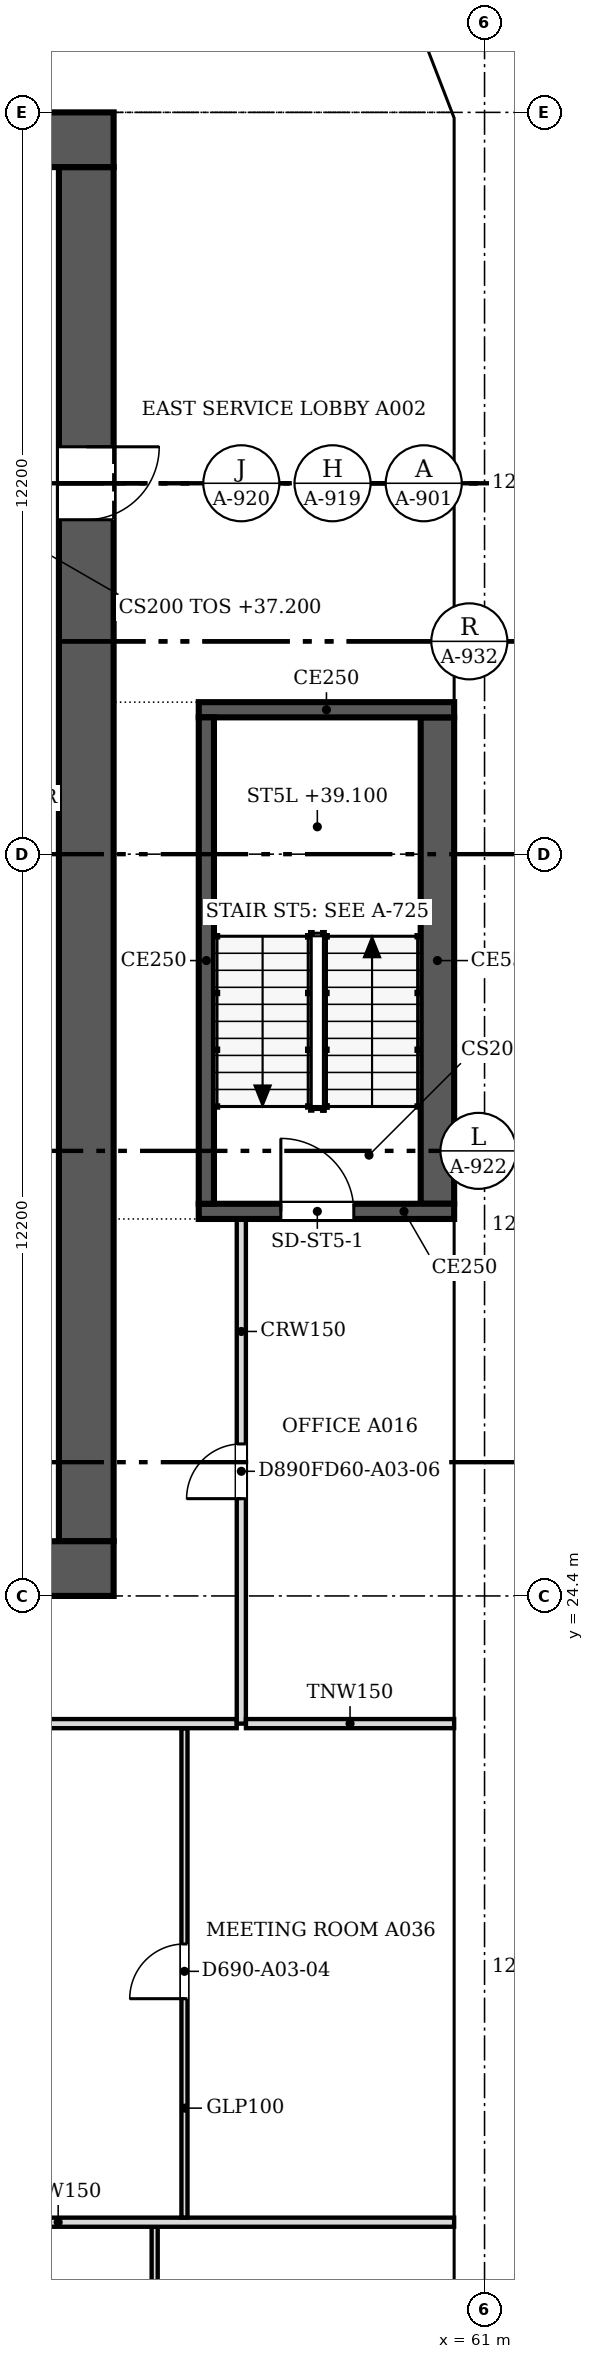
"""IFC4 building model, lengths in metres.
Left out: names, types, materials, properties, quantities, classifications, styles, units other than length and angle.
Written with IfcOpenShell. Run it as: python <this file> out.ifc"""

import sys

from ifc_helpers import new_model, si_unit, direction, frame, frame_2d, origin, place, context, subcontext, project, spatial, polyline, rectangle, outline, extrude, faceted_brep, source, transform, mapped, element, fill, save


model = new_model("IFC4")
c1 = context("Model", 3, precision=1e-05, world=origin(), true_north=direction((0.0, 1.0)))
c2 = subcontext(c1, "Body", "Model", "MODEL_VIEW")
j1 = project(units=[si_unit("LENGTHUNIT", "METRE"), si_unit("PLANEANGLEUNIT", "RADIAN")], contexts=[c1])
p1 = place(None, origin())
s1 = spatial("IfcSite", under=j1, at=p1, CompositionType="ELEMENT")
p2 = place(p1, origin())
s2 = spatial("IfcBuilding", under=s1, at=p2, CompositionType="ELEMENT")
p3 = place(p2, frame((0.0, 0.0, 37.2)))
s3 = spatial("IfcBuildingStorey", under=s2, at=p3, CompositionType="ELEMENT", Elevation=37.2)
m1 = source(origin(), c2, "Body", "SweptSolid", [
    extrude(outline(polyline([(3.05, 0.0), (6.1, 3.8), (3.05, 7.6), (0.0, 3.8), (3.05, 0.0)])), frame((0.0, 0.25, 0.0), z_axis=(0.0, -1.0, 0.0), x_axis=(1.0, 0.0, 0.0)), (0.0, 0.0, 1.0), 0.5),
])
p4 = place(p3, frame((60.75, 9.15, -3.8), z_axis=(0.0, 0.0, 1.0), x_axis=(0.0, 1.0, 0.0)))
e1 = element("IfcWall", 1, at=p4, inside=s3, PredefinedType="SOLIDWALL", context=c2, shape_type="MappedRepresentation", body=[
    mapped(m1, transform((0.0, 0.0, 0.0), scale=1.0)),
])
m2 = source(origin(), c2, "Body", "SweptSolid", [
    extrude(outline(polyline([(3.05, 0.399), (5.78, 3.8), (3.05, 7.201), (0.321, 3.8), (3.05, 0.399)])), frame((0.0, 0.26, 0.0), z_axis=(0.0, -1.0, 0.0), x_axis=(1.0, 0.0, 0.0)), (0.0, 0.0, 1.0), 0.52),
])
p5 = place(p4, origin())
e2 = element("IfcOpeningElement", 2, at=p5, cuts=e1, PredefinedType="OPENING", context=c2, shape_type="MappedRepresentation", body=[
    mapped(m2, transform((0.0, 0.0, 0.0), scale=1.0)),
])
p6 = place(p3, frame((60.75, 15.25, -3.8), z_axis=(0.0, 0.0, 1.0), x_axis=(0.0, 1.0, 0.0)))
e3 = element("IfcWall", 3, at=p6, inside=s3, PredefinedType="SOLIDWALL", context=c2, shape_type="MappedRepresentation", body=[
    mapped(m1, transform((0.0, 0.0, 0.0), scale=1.0)),
])
p7 = place(p6, origin())
e4 = element("IfcOpeningElement", 4, at=p7, cuts=e3, PredefinedType="OPENING", context=c2, shape_type="MappedRepresentation", body=[
    mapped(m2, transform((0.0, 0.0, 0.0), scale=1.0)),
])
m3 = source(origin(), c2, "Body", "Brep", [
    faceted_brep([(3.05, -0.25, 0.0), (6.1, -0.25, 3.8), (6.1, -0.25, 3.8), (3.05, -0.25, 7.6), (0.0, -0.25, 3.8), (0.0, 0.25, 3.8), (3.05, 0.25, 7.6), (6.1, 0.25, 3.8), (6.1, 0.25, 3.8), (3.05, 0.25, 0.0)], [[[0, 1, 2, 3, 4]], [[5, 6, 7, 8, 9]], [[9, 8, 1, 0]], [[7, 6, 3, 2]], [[6, 5, 4, 3]], [[5, 9, 0, 4]], [[1, 8, 7, 2]]]),
])
p8 = place(p3, frame((60.75, 21.35, -3.8), z_axis=(0.0, 0.0, 1.0), x_axis=(0.0, 1.0, 0.0)))
e5 = element("IfcWall", 5, at=p8, inside=s3, PredefinedType="SOLIDWALL", context=c2, shape_type="MappedRepresentation", body=[
    mapped(m3, transform((0.0, 0.0, 0.0), scale=1.0)),
])
p9 = place(p8, origin())
e6 = element("IfcOpeningElement", 6, at=p9, cuts=e5, PredefinedType="OPENING", context=c2, shape_type="MappedRepresentation", body=[
    mapped(m2, transform((0.0, 0.0, 0.0), scale=1.0)),
])
p10 = place(p3, frame((60.75, 27.45, -3.8), z_axis=(0.0, 0.0, 1.0), x_axis=(0.0, 1.0, 0.0)))
e7 = element("IfcWall", 7, at=p10, inside=s3, PredefinedType="SOLIDWALL", context=c2, shape_type="MappedRepresentation", body=[
    mapped(m1, transform((0.0, 0.0, 0.0), scale=1.0)),
])
p11 = place(p10, origin())
e8 = element("IfcOpeningElement", 8, at=p11, cuts=e7, PredefinedType="OPENING", context=c2, shape_type="MappedRepresentation", body=[
    mapped(m2, transform((0.0, 0.0, 0.0), scale=1.0)),
])
p12 = place(p3, frame((60.75, 33.55, -3.8), z_axis=(0.0, 0.0, 1.0), x_axis=(0.0, 1.0, 0.0)))
e9 = element("IfcWall", 9, at=p12, inside=s3, PredefinedType="SOLIDWALL", context=c2, shape_type="MappedRepresentation", body=[
    mapped(m3, transform((0.0, 0.0, 0.0), scale=1.0)),
])
p13 = place(p12, origin())
e10 = element("IfcOpeningElement", 10, at=p13, cuts=e9, PredefinedType="OPENING", context=c2, shape_type="MappedRepresentation", body=[
    mapped(m2, transform((0.0, 0.0, 0.0), scale=1.0)),
])
p14 = place(p3, frame((60.75, 39.65, -3.8), z_axis=(0.0, 0.0, 1.0), x_axis=(0.0, 1.0, 0.0)))
e11 = element("IfcWall", 11, at=p14, inside=s3, PredefinedType="SOLIDWALL", context=c2, shape_type="MappedRepresentation", body=[
    mapped(m1, transform((0.0, 0.0, 0.0), scale=1.0)),
])
p15 = place(p14, origin())
e12 = element("IfcOpeningElement", 12, at=p15, cuts=e11, PredefinedType="OPENING", context=c2, shape_type="MappedRepresentation", body=[
    mapped(m2, transform((0.0, 0.0, 0.0), scale=1.0)),
])
m4 = source(origin(), c2, "Body", "Brep", [
    faceted_brep([(3.003, -0.25, 0.0), (3.05, -0.25, 0.06), (3.05, -0.25, 7.54), (3.003, -0.25, 7.6), (0.0, -0.25, 3.8), (0.0, 0.25, 3.8), (2.957, 0.25, 7.541), (2.957, 0.25, 0.059), (3.003, 0.0, 0.0), (3.003, 0.0, 7.6)], [[[0, 1, 2, 3, 4]], [[5, 6, 7]], [[1, 0, 8]], [[9, 3, 2]], [[6, 5, 4, 3, 9]], [[5, 7, 8, 0, 4]], [[1, 8, 7, 6, 9, 2]]]),
])
p16 = place(p3, frame((60.75, 45.75, -3.8), z_axis=(0.0, 0.0, 1.0), x_axis=(0.0, 1.0, 0.0)))
e13 = element("IfcWall", 13, at=p16, inside=s3, PredefinedType="SOLIDWALL", context=c2, shape_type="MappedRepresentation", body=[
    mapped(m4, transform((0.0, 0.0, 0.0), scale=1.0)),
])
m5 = source(origin(), c2, "Body", "SweptSolid", [
    extrude(outline(polyline([(2.803, 6.944), (0.319, 3.8), (2.803, 0.656), (2.803, 6.944)])), frame((0.0, 0.26, 0.0), z_axis=(0.0, -1.0, 0.0), x_axis=(1.0, 0.0, 0.0)), (0.0, 0.0, 1.0), 0.52),
])
p17 = place(p16, origin())
e14 = element("IfcOpeningElement", 14, at=p17, cuts=e13, PredefinedType="OPENING", context=c2, shape_type="MappedRepresentation", body=[
    mapped(m5, transform((0.0, 0.0, 0.0), scale=1.0)),
])
m6 = source(origin(), c2, "Body", "Brep", [
    faceted_brep([(0.047, -0.25, 0.0), (2.997, -0.25, 3.8), (0.047, -0.25, 7.6), (0.0, -0.25, 7.541), (0.0, -0.25, 0.059), (0.093, 0.25, 7.54), (2.944, 0.25, 3.868), (2.944, 0.25, 3.732), (0.093, 0.25, 0.06), (2.997, 0.0, 3.8), (0.047, 0.0, 0.0), (0.047, 0.0, 7.6)], [[[0, 1, 2, 3, 4]], [[5, 6, 7, 8]], [[8, 7, 9, 1, 0, 10]], [[6, 5, 11, 2, 1, 9]], [[3, 2, 11]], [[10, 0, 4]], [[8, 10, 4, 3, 11, 5]], [[9, 7, 6]]]),
])
p18 = place(p3, frame((60.767, 48.71, -3.8), z_axis=(0.0, 0.0, 1.0), x_axis=(-0.359901446078, 0.932990326376, 0.0)))
e15 = element("IfcWall", 15, at=p18, inside=s3, PredefinedType="SOLIDWALL", context=c2, shape_type="MappedRepresentation", body=[
    mapped(m6, transform((0.0, 0.0, 0.0), scale=1.0)),
])
m7 = source(origin(), c2, "Body", "SweptSolid", [
    extrude(outline(polyline([(0.247, 0.665), (2.681, 3.8), (0.247, 6.935), (0.247, 0.665)])), frame((0.0, 0.26, 0.0), z_axis=(0.0, -1.0, 0.0), x_axis=(1.0, 0.0, 0.0)), (0.0, 0.0, 1.0), 0.52),
])
p19 = place(p18, origin())
e16 = element("IfcOpeningElement", 16, at=p19, cuts=e15, PredefinedType="OPENING", context=c2, shape_type="MappedRepresentation", body=[
    mapped(m7, transform((0.0, 0.0, 0.0), scale=1.0)),
])
p20 = place(p2, frame((0.0, 0.0, 41.0)))
s4 = spatial("IfcBuildingStorey", under=s2, at=p20, CompositionType="ELEMENT", Elevation=41.0)
p21 = place(p20, frame((60.75, 12.2, -3.8), z_axis=(0.0, 0.0, 1.0), x_axis=(0.0, 1.0, 0.0)))
e17 = element("IfcWall", 17, at=p21, inside=s4, PredefinedType="SOLIDWALL", context=c2, shape_type="MappedRepresentation", body=[
    mapped(m1, transform((0.0, 0.0, 0.0), scale=1.0)),
])
p22 = place(p21, origin())
e18 = element("IfcOpeningElement", 18, at=p22, cuts=e17, PredefinedType="OPENING", context=c2, shape_type="MappedRepresentation", body=[
    mapped(m2, transform((0.0, 0.0, 0.0), scale=1.0)),
])
p23 = place(p20, frame((60.75, 18.3, -3.8), z_axis=(0.0, 0.0, 1.0), x_axis=(0.0, 1.0, 0.0)))
e19 = element("IfcWall", 19, at=p23, inside=s4, PredefinedType="SOLIDWALL", context=c2, shape_type="MappedRepresentation", body=[
    mapped(m3, transform((0.0, 0.0, 0.0), scale=1.0)),
])
p24 = place(p23, origin())
e20 = element("IfcOpeningElement", 20, at=p24, cuts=e19, PredefinedType="OPENING", context=c2, shape_type="MappedRepresentation", body=[
    mapped(m2, transform((0.0, 0.0, 0.0), scale=1.0)),
])
p25 = place(p20, frame((60.75, 24.4, -3.8), z_axis=(0.0, 0.0, 1.0), x_axis=(0.0, 1.0, 0.0)))
e21 = element("IfcWall", 21, at=p25, inside=s4, PredefinedType="SOLIDWALL", context=c2, shape_type="MappedRepresentation", body=[
    mapped(m1, transform((0.0, 0.0, 0.0), scale=1.0)),
])
p26 = place(p25, origin())
e22 = element("IfcOpeningElement", 22, at=p26, cuts=e21, PredefinedType="OPENING", context=c2, shape_type="MappedRepresentation", body=[
    mapped(m2, transform((0.0, 0.0, 0.0), scale=1.0)),
])
p27 = place(p20, frame((60.75, 30.5, -3.8), z_axis=(0.0, 0.0, 1.0), x_axis=(0.0, 1.0, 0.0)))
e23 = element("IfcWall", 23, at=p27, inside=s4, PredefinedType="SOLIDWALL", context=c2, shape_type="MappedRepresentation", body=[
    mapped(m1, transform((0.0, 0.0, 0.0), scale=1.0)),
])
p28 = place(p27, origin())
e24 = element("IfcOpeningElement", 24, at=p28, cuts=e23, PredefinedType="OPENING", context=c2, shape_type="MappedRepresentation", body=[
    mapped(m2, transform((0.0, 0.0, 0.0), scale=1.0)),
])
p29 = place(p20, frame((60.75, 36.6, -3.8), z_axis=(0.0, 0.0, 1.0), x_axis=(0.0, 1.0, 0.0)))
e25 = element("IfcWall", 25, at=p29, inside=s4, PredefinedType="SOLIDWALL", context=c2, shape_type="MappedRepresentation", body=[
    mapped(m3, transform((0.0, 0.0, 0.0), scale=1.0)),
])
p30 = place(p29, origin())
e26 = element("IfcOpeningElement", 26, at=p30, cuts=e25, PredefinedType="OPENING", context=c2, shape_type="MappedRepresentation", body=[
    mapped(m2, transform((0.0, 0.0, 0.0), scale=1.0)),
])
m8 = source(origin(), c2, "Body", "Brep", [
    faceted_brep([(3.05, -0.25, 0.0), (6.053, -0.25, 3.8), (3.05, -0.25, 7.6), (0.0, -0.25, 3.8), (0.0, 0.25, 3.8), (3.05, 0.25, 7.6), (6.007, 0.25, 3.859), (6.007, 0.25, 3.741), (3.05, 0.25, 0.0), (6.053, 0.0, 3.8)], [[[0, 1, 2, 3]], [[4, 5, 6, 7, 8]], [[8, 7, 9, 1, 0]], [[6, 5, 2, 1, 9]], [[5, 4, 3, 2]], [[4, 8, 0, 3]], [[9, 7, 6]]]),
])
p31 = place(p20, frame((60.75, 42.7, -3.8), z_axis=(0.0, 0.0, 1.0), x_axis=(0.0, 1.0, 0.0)))
e27 = element("IfcWall", 27, at=p31, inside=s4, PredefinedType="SOLIDWALL", context=c2, shape_type="MappedRepresentation", body=[
    mapped(m8, transform((0.0, 0.0, 0.0), scale=1.0)),
])
m9 = source(origin(), c2, "Body", "SweptSolid", [
    extrude(outline(polyline([(3.049, 0.401), (5.735, 3.8), (3.049, 7.199), (0.321, 3.8), (3.049, 0.401)])), frame((0.0, 0.26, 0.0), z_axis=(0.0, -1.0, 0.0), x_axis=(1.0, 0.0, 0.0)), (0.0, 0.0, 1.0), 0.52),
])
p32 = place(p31, origin())
e28 = element("IfcOpeningElement", 28, at=p32, cuts=e27, PredefinedType="OPENING", context=c2, shape_type="MappedRepresentation", body=[
    mapped(m9, transform((0.0, 0.0, 0.0), scale=1.0)),
])
m10 = source(origin(), c2, "Body", "Brep", [
    faceted_brep([(2.95, -0.25, 0.0), (3.003, -0.25, 0.068), (3.003, -0.25, 7.532), (2.95, -0.25, 7.6), (0.0, -0.25, 3.8), (0.047, 0.25, 3.86), (2.898, 0.25, 7.532), (2.898, 0.25, 0.068), (0.047, 0.25, 3.74), (2.95, 0.0, 0.0), (2.95, 0.0, 7.6), (0.0, 0.0, 3.8)], [[[0, 1, 2, 3, 4]], [[5, 6, 7, 8]], [[1, 0, 9]], [[10, 3, 2]], [[6, 5, 11, 4, 3, 10]], [[8, 7, 9, 0, 4, 11]], [[8, 11, 5]], [[1, 9, 7, 6, 10, 2]]]),
])
p33 = place(p20, frame((60.75, 48.753, -3.8), z_axis=(0.0, 0.0, 1.0), x_axis=(-0.35992665181, 0.932980602862, 0.0)))
e29 = element("IfcWall", 29, at=p33, inside=s4, PredefinedType="SOLIDWALL", context=c2, shape_type="MappedRepresentation", body=[
    mapped(m10, transform((0.0, 0.0, 0.0), scale=1.0)),
])
m11 = source(origin(), c2, "Body", "SweptSolid", [
    extrude(outline(polyline([(2.75, 6.935), (0.316, 3.8), (2.75, 0.665), (2.75, 6.935)])), frame((0.0, 0.26, 0.0), z_axis=(0.0, -1.0, 0.0), x_axis=(1.0, 0.0, 0.0)), (0.0, 0.0, 1.0), 0.52),
])
p34 = place(p33, origin())
e30 = element("IfcOpeningElement", 30, at=p34, cuts=e29, PredefinedType="OPENING", context=c2, shape_type="MappedRepresentation", body=[
    mapped(m11, transform((0.0, 0.0, 0.0), scale=1.0)),
])
p35 = place(p3, frame((54.9, 24.85, 0.0), z_axis=(0.0, 0.0, 1.0), x_axis=(-1.0, 0.0, 0.0)))
e31 = element("IfcWall", 31, at=p35, inside=s3, PredefinedType="SHEAR", context=c2, shape_type="SweptSolid", body=[
    extrude(rectangle(XDim=24.4, YDim=0.9, at=frame_2d((12.2, 0.0))), origin(), (0.0, 0.0, 1.0), 3.8),
])
m12 = source(origin(), c2, "Body", "SweptSolid", [
    extrude(rectangle(XDim=1.2, YDim=2.1, at=frame_2d((0.6, 1.05))), frame((0.0, 0.46, 0.0), z_axis=(0.0, -1.0, 0.0), x_axis=(1.0, 0.0, 0.0)), (0.0, 0.0, 1.0), 0.92),
])
p36 = place(p35, frame((1.5, 0.0, 0.0)))
e32 = element("IfcOpeningElement", 32, at=p36, cuts=e31, PredefinedType="OPENING", context=c2, shape_type="MappedRepresentation", body=[
    mapped(m12, transform((0.0, 0.0, 0.0), scale=1.0)),
])
p37 = place(p3, frame((30.5, 48.35, 0.0), z_axis=(0.0, 0.0, 1.0), x_axis=(1.0, 0.0, 0.0)))
e33 = element("IfcWall", 33, at=p37, inside=s3, PredefinedType="SHEAR", context=c2, shape_type="SweptSolid", body=[
    extrude(rectangle(XDim=24.4, YDim=0.9, at=frame_2d((12.2, 0.0))), origin(), (0.0, 0.0, 1.0), 3.8),
])
p38 = place(p3, frame((54.45, 47.9, 0.0), z_axis=(0.0, 0.0, 1.0), x_axis=(0.0, -1.0, 0.0)))
e34 = element("IfcWall", 34, at=p38, inside=s3, PredefinedType="SHEAR", context=c2, shape_type="SweptSolid", body=[
    extrude(rectangle(XDim=22.6, YDim=0.9, at=frame_2d((11.3, 0.0))), origin(), (0.0, 0.0, 1.0), 3.8),
])
p39 = place(p38, frame((4.6, 0.0, 0.0)))
e35 = element("IfcOpeningElement", 35, at=p39, cuts=e34, PredefinedType="OPENING", context=c2, shape_type="MappedRepresentation", body=[
    mapped(m12, transform((0.0, 0.0, 0.0), scale=1.0)),
])
p40 = place(p3, frame((60.5, 30.725, 0.0), z_axis=(0.0, 0.0, 1.0), x_axis=(-1.0, 0.0, 0.0)))
e36 = element("IfcWall", 36, at=p40, inside=s3, PredefinedType="SOLIDWALL", context=c2, shape_type="SweptSolid", body=[
    extrude(rectangle(XDim=4.2, YDim=0.25, at=frame_2d((2.1, 0.0))), origin(), (0.0, 0.0, 1.0), 3.8),
])
m13 = source(origin(), c2, "Body", "SweptSolid", [
    extrude(rectangle(XDim=1.2, YDim=2.1, at=frame_2d((0.6, 1.05))), frame((0.0, 0.135, 0.0), z_axis=(0.0, -1.0, 0.0), x_axis=(1.0, 0.0, 0.0)), (0.0, 0.0, 1.0), 0.27),
])
p41 = place(p40, frame((1.65, 0.0, 0.0)))
e37 = element("IfcOpeningElement", 37, at=p41, cuts=e36, PredefinedType="OPENING", context=c2, shape_type="MappedRepresentation", body=[
    mapped(m13, transform((0.0, 0.0, 0.0), scale=1.0)),
])
p42 = place(p3, frame((56.425, 30.85, 0.0), z_axis=(0.0, 0.0, 1.0), x_axis=(0.0, 1.0, 0.0)))
e38 = element("IfcWall", 38, at=p42, inside=s3, PredefinedType="SOLIDWALL", context=c2, shape_type="SweptSolid", body=[
    extrude(rectangle(XDim=8.0, YDim=0.25, at=frame_2d((4.0, 0.0))), origin(), (0.0, 0.0, 1.0), 3.8),
])
p43 = place(p3, frame((56.3, 38.975, 0.0), z_axis=(0.0, 0.0, 1.0), x_axis=(1.0, 0.0, 0.0)))
e39 = element("IfcWall", 39, at=p43, inside=s3, PredefinedType="SOLIDWALL", context=c2, shape_type="SweptSolid", body=[
    extrude(rectangle(XDim=4.2, YDim=0.25, at=frame_2d((2.1, 0.0))), origin(), (0.0, 0.0, 1.0), 3.8),
])
p44 = place(p3, frame((60.225, 38.85, 0.0), z_axis=(0.0, 0.0, 1.0), x_axis=(0.0, -1.0, 0.0)))
e40 = element("IfcWall", 40, at=p44, inside=s3, PredefinedType="SOLIDWALL", context=c2, shape_type="SweptSolid", body=[
    extrude(rectangle(XDim=8.0, YDim=0.55, at=frame_2d((4.0, 0.0))), origin(), (0.0, 0.0, 1.0), 3.8),
])
p45 = place(p3, frame((55.575, 14.024, 0.0), z_axis=(0.0, 0.0, 1.0), x_axis=(0.0, -1.0, 0.0)))
e41 = element("IfcWall", 41, at=p45, inside=s3, PredefinedType="PARTITIONING", context=c2, shape_type="SweptSolid", body=[
    extrude(rectangle(XDim=5.924, YDim=0.1, at=frame_2d((2.962, 0.0))), origin(), (0.0, 0.0, 1.0), 3.067),
])
m14 = source(origin(), c2, "Body", "SweptSolid", [
    extrude(rectangle(XDim=0.9, YDim=2.1, at=frame_2d((0.45, 1.05))), frame((0.0, 0.06, 0.0), z_axis=(0.0, -1.0, 0.0), x_axis=(1.0, 0.0, 0.0)), (0.0, 0.0, 1.0), 0.12),
])
p46 = place(p45, frame((2.524, 0.0, 0.0)))
e42 = element("IfcOpeningElement", 42, at=p46, cuts=e41, PredefinedType="OPENING", context=c2, shape_type="MappedRepresentation", body=[
    mapped(m14, transform((0.0, 0.0, 0.0), scale=1.0)),
])
p47 = place(p3, frame((47.476, 14.1, 0.0), z_axis=(0.0, 0.0, 1.0), x_axis=(1.0, 0.0, 0.0)))
e43 = element("IfcWall", 43, at=p47, inside=s3, PredefinedType="PARTITIONING", context=c2, shape_type="SweptSolid", body=[
    extrude(rectangle(XDim=13.024, YDim=0.15, at=frame_2d((6.512, 0.0))), origin(), (0.0, 0.0, 1.0), 3.067),
])
p48 = place(p3, frame((56.065, 22.224, 0.0), z_axis=(0.0, 0.0, 1.0), x_axis=(0.0, -1.0, 0.0)))
e44 = element("IfcWall", 44, at=p48, inside=s3, PredefinedType="PARTITIONING", context=c2, shape_type="SweptSolid", body=[
    extrude(rectangle(XDim=8.048, YDim=0.1, at=frame_2d((4.024, 0.0))), origin(), (0.0, 0.0, 1.0), 3.067),
])
p49 = place(p48, frame((3.548, 0.0, 0.0)))
e45 = element("IfcOpeningElement", 45, at=p49, cuts=e44, PredefinedType="OPENING", context=c2, shape_type="MappedRepresentation", body=[
    mapped(m14, transform((0.0, 0.0, 0.0), scale=1.0)),
])
p50 = place(p3, frame((47.4, 22.3, 0.0), z_axis=(0.0, 0.0, 1.0), x_axis=(1.0, 0.0, 0.0)))
e46 = element("IfcWall", 46, at=p50, inside=s3, PredefinedType="PARTITIONING", context=c2, shape_type="SweptSolid", body=[
    extrude(rectangle(XDim=9.524, YDim=0.15, at=frame_2d((4.762, 0.0))), origin(), (0.0, 0.0, 1.0), 3.067),
])
p51 = place(p3, frame((57.0, 30.6, 0.0), z_axis=(0.0, 0.0, 1.0), x_axis=(0.0, -1.0, 0.0)))
e47 = element("IfcWall", 47, at=p51, inside=s3, PredefinedType="PARTITIONING", context=c2, shape_type="SweptSolid", body=[
    extrude(rectangle(XDim=8.3, YDim=0.15, at=frame_2d((4.15, 0.0))), origin(), (0.0, 0.0, 1.0), 3.067),
])
m15 = source(origin(), c2, "Body", "SweptSolid", [
    extrude(rectangle(XDim=0.9, YDim=2.1, at=frame_2d((0.45, 1.05))), frame((0.0, 0.085, 0.0), z_axis=(0.0, -1.0, 0.0), x_axis=(1.0, 0.0, 0.0)), (0.0, 0.0, 1.0), 0.17),
])
p52 = place(p51, frame((3.7, 0.0, 0.0)))
e48 = element("IfcOpeningElement", 48, at=p52, cuts=e47, PredefinedType="OPENING", context=c2, shape_type="MappedRepresentation", body=[
    mapped(m15, transform((0.0, 0.0, 0.0), scale=1.0)),
])
p53 = place(p3, frame((57.076, 22.3, 0.0), z_axis=(0.0, 0.0, 1.0), x_axis=(1.0, 0.0, 0.0)))
e49 = element("IfcWall", 49, at=p53, inside=s3, PredefinedType="PARTITIONING", context=c2, shape_type="SweptSolid", body=[
    extrude(rectangle(XDim=3.424, YDim=0.15, at=frame_2d((1.712, 0.0))), origin(), (0.0, 0.0, 1.0), 3.067),
])
m16 = source(origin(), c2, "Body", "SweptSolid", [
    extrude(rectangle(XDim=1.2, YDim=2.1, at=frame_2d((0.6, 1.05))), frame((0.0, 0.025, 0.0), z_axis=(0.0, -1.0, 0.0), x_axis=(1.0, 0.0, 0.0)), (0.0, 0.0, 1.0), 0.05),
])
p54 = place(p39, origin())
e50 = element("IfcDoor", 50, at=p54, inside=s3, OperationType="SINGLE_SWING_LEFT", PredefinedType="DOOR", context=c2, shape_type="MappedRepresentation", body=[
    mapped(m16, transform((0.0, 0.0, 0.0), scale=1.0)),
])
fill(e35, e50)
p55 = place(p41, origin())
e51 = element("IfcDoor", 51, at=p55, inside=s3, OperationType="SINGLE_SWING_RIGHT", PredefinedType="DOOR", context=c2, shape_type="MappedRepresentation", body=[
    mapped(m16, transform((0.0, 0.0, 0.0), scale=1.0)),
])
fill(e37, e51)
m17 = source(origin(), c2, "Body", "SweptSolid", [
    extrude(rectangle(XDim=0.9, YDim=2.1, at=frame_2d((0.45, 1.05))), frame((0.0, 0.025, 0.0), z_axis=(0.0, -1.0, 0.0), x_axis=(1.0, 0.0, 0.0)), (0.0, 0.0, 1.0), 0.05),
])
p56 = place(p49, origin())
e52 = element("IfcDoor", 52, at=p56, inside=s3, OperationType="SINGLE_SWING_RIGHT", PredefinedType="DOOR", context=c2, shape_type="MappedRepresentation", body=[
    mapped(m17, transform((0.0, 0.0, 0.0), scale=1.0)),
])
fill(e45, e52)
p57 = place(p52, origin())
e53 = element("IfcDoor", 53, at=p57, inside=s3, OperationType="SINGLE_SWING_RIGHT", PredefinedType="DOOR", context=c2, shape_type="MappedRepresentation", body=[
    mapped(m17, transform((0.0, 0.0, 0.0), scale=1.0)),
])
fill(e48, e53)
save(model, sys.argv[1])
